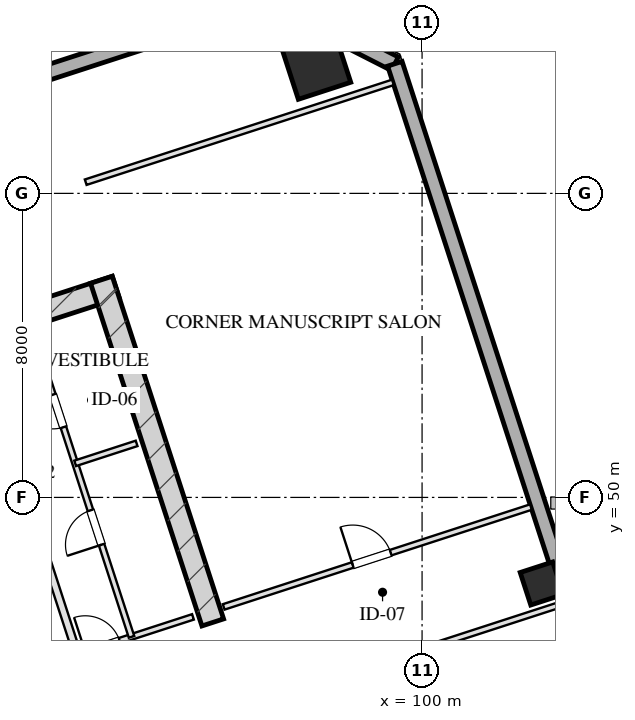
"""IFC4 building model, lengths in metres.
Left out: names, types, materials, properties, quantities, classifications, styles, units other than length and angle.
Written with IfcOpenShell. Run it as: python <this file> out.ifc"""

import sys

from ifc_helpers import new_model, si_unit, direction, frame, frame_2d, origin, origin_2d, place, context, subcontext, project, spatial, rectangle, hollow_rectangle, extrude, element, fill, save


model = new_model("IFC4")
c1 = context("Model", 3, precision=1e-05, world=origin(), true_north=direction((0.0, 1.0)))
c2 = subcontext(c1, "Body", "Model", "MODEL_VIEW")
j1 = project(units=[si_unit("LENGTHUNIT", "METRE"), si_unit("PLANEANGLEUNIT", "RADIAN")], contexts=[c1])
p1 = place(None, origin())
s1 = spatial("IfcSite", under=j1, at=p1, CompositionType="ELEMENT")
p2 = place(p1, origin())
s2 = spatial("IfcBuilding", under=s1, at=p2, CompositionType="ELEMENT")
p3 = place(p2, frame((0.0, 0.0, 100.05)))
s3 = spatial("IfcBuildingStorey", under=s2, at=p3, CompositionType="ELEMENT", Elevation=100.05)
p4 = place(p3, frame((76.344, 50.466, 0.0), z_axis=(0.0, 0.0, 1.0), x_axis=(0.951055727519, 0.309019421968, 0.0)))
e1 = element("IfcWall", 1, at=p4, inside=s3, PredefinedType="SHEAR", context=c2, shape_type="SweptSolid", body=[
    extrude(rectangle(XDim=16.4, YDim=0.6, at=frame_2d((8.2, 0.0))), origin(), (0.0, 0.0, 1.0), 3.45),
])
p5 = place(p3, frame((94.492, 46.71, 0.0), z_axis=(0.0, 0.0, 1.0), x_axis=(-0.309010370028, 0.95105866865, 0.0)))
e2 = element("IfcWall", 2, at=p5, inside=s3, PredefinedType="SHEAR", context=c2, shape_type="SweptSolid", body=[
    extrude(rectangle(XDim=9.48, YDim=0.6, at=frame_2d((4.74, 0.0))), origin(), (0.0, 0.0, 1.0), 3.45),
])
p6 = place(p3, frame((97.209, 61.388, 0.0), z_axis=(0.0, 0.0, 1.0), x_axis=(0.951056516295, 0.309016994375, 0.0)))
e3 = element("IfcColumn", 3, at=p6, inside=s3, PredefinedType="COLUMN", context=c2, shape_type="SweptSolid", body=[
    extrude(hollow_rectangle(XDim=1.45, YDim=1.45, WallThickness=0.05, at=origin_2d()), origin(), (0.0, 0.0, 1.0), 3.451),
])
p7 = place(p3, frame((103.149, 47.736, 0.0), z_axis=(0.0, 0.0, 1.0), x_axis=(0.951056516295, 0.309016994375, 0.0)))
e4 = element("IfcColumn", 4, at=p7, inside=s3, PredefinedType="COLUMN", context=c2, shape_type="SweptSolid", body=[
    extrude(hollow_rectangle(XDim=0.9, YDim=0.9, WallThickness=0.032, at=origin_2d()), origin(), (0.0, 0.0, 1.0), 3.451),
])
p8 = place(p3, frame((68.047, 53.995, 0.0), z_axis=(0.0, 0.0, 1.0), x_axis=(0.95105505922, 0.309021478754, 0.0)))
e5 = element("IfcWall", 5, at=p8, inside=s3, PredefinedType="SOLIDWALL", context=c2, shape_type="SweptSolid", body=[
    extrude(rectangle(XDim=29.4, YDim=0.4, at=frame_2d((14.7, 0.0))), origin(), (0.0, 0.0, 1.0), 2.55),
])
p9 = place(p3, frame((96.008, 63.08, 0.0), z_axis=(0.0, 0.0, 1.0), x_axis=(0.891001999643, -0.45399937955, 0.0)))
e6 = element("IfcWall", 6, at=p9, inside=s3, PredefinedType="SOLIDWALL", context=c2, shape_type="SweptSolid", body=[
    extrude(rectangle(XDim=3.677, YDim=0.4, at=frame_2d((1.839, 0.0))), origin(), (0.0, 0.0, 1.0), 2.55),
])
p10 = place(p3, frame((99.284, 61.41, 0.0), z_axis=(0.0, 0.0, 1.0), x_axis=(0.309017542002, -0.95105633836, 0.0)))
e7 = element("IfcWall", 7, at=p10, inside=s3, PredefinedType="SOLIDWALL", context=c2, shape_type="SweptSolid", body=[
    extrude(rectangle(XDim=46.4, YDim=0.4, at=frame_2d((23.2, 0.0))), origin(), (0.0, 0.0, 1.0), 2.55),
])
p11 = place(p10, frame((19.55, 0.0, 0.0)))
e8 = element("IfcOpeningElement", 8, at=p11, cuts=e7, PredefinedType="OPENING", context=c2, shape_type="SweptSolid", body=[
    extrude(rectangle(XDim=1.1, YDim=2.15, at=frame_2d((0.55, 1.075))), frame((0.0, 0.21, 0.0), z_axis=(0.0, -1.0, 0.0), x_axis=(1.0, 0.0, 0.0)), (0.0, 0.0, 1.0), 0.42),
])
p12 = place(p3, frame((90.928, 45.868, 0.0), z_axis=(0.0, 0.0, 1.0), x_axis=(-0.309042196757, 0.951048327176, 0.0)))
e9 = element("IfcWall", 9, at=p12, inside=s3, PredefinedType="PARTITIONING", context=c2, shape_type="SweptSolid", body=[
    extrude(rectangle(XDim=8.43, YDim=0.2, at=frame_2d((4.215, 0.0))), origin(), (0.0, 0.0, 1.0), 3.155),
])
p13 = place(p3, frame((90.928, 45.868, 0.0), z_axis=(0.0, 0.0, 1.0), x_axis=(0.951059297078, 0.309008435874, 0.0)))
e10 = element("IfcWall", 10, at=p13, inside=s3, PredefinedType="PARTITIONING", context=c2, shape_type="SweptSolid", body=[
    extrude(rectangle(XDim=3.2, YDim=0.15, at=frame_2d((1.6, 0.0))), origin(), (0.0, 0.0, 1.0), 3.155),
])
p14 = place(p13, frame((0.22, 0.0, 0.0)))
e11 = element("IfcOpeningElement", 11, at=p14, cuts=e10, PredefinedType="OPENING", context=c2, shape_type="SweptSolid", body=[
    extrude(rectangle(XDim=0.95, YDim=2.05, at=frame_2d((0.475, 1.025))), frame((0.0, 0.085, 0.0), z_axis=(0.0, -1.0, 0.0), x_axis=(1.0, 0.0, 0.0)), (0.0, 0.0, 1.0), 0.17),
])
p15 = place(p3, frame((92.355, 46.331, 0.0), z_axis=(0.0, 0.0, 1.0), x_axis=(-0.309007490203, 0.951059604335, 0.0)))
e12 = element("IfcWall", 12, at=p15, inside=s3, PredefinedType="PARTITIONING", context=c2, shape_type="SweptSolid", body=[
    extrude(rectangle(XDim=8.43, YDim=0.15, at=frame_2d((4.215, 0.0))), origin(), (0.0, 0.0, 1.0), 3.155),
])
p16 = place(p15, frame((2.55, 0.0, 0.0)))
e13 = element("IfcOpeningElement", 13, at=p16, cuts=e12, PredefinedType="OPENING", context=c2, shape_type="SweptSolid", body=[
    extrude(rectangle(XDim=0.95, YDim=2.05, at=frame_2d((0.475, 1.025))), frame((0.0, 0.085, 0.0), z_axis=(0.0, -1.0, 0.0), x_axis=(1.0, 0.0, 0.0)), (0.0, 0.0, 1.0), 0.17),
])
p17 = place(p15, frame((5.8, 0.0, 0.0)))
e14 = element("IfcOpeningElement", 14, at=p17, cuts=e12, PredefinedType="OPENING", context=c2, shape_type="SweptSolid", body=[
    extrude(rectangle(XDim=0.9, YDim=2.05, at=frame_2d((0.45, 1.025))), frame((0.0, 0.085, 0.0), z_axis=(0.0, -1.0, 0.0), x_axis=(1.0, 0.0, 0.0)), (0.0, 0.0, 1.0), 0.17),
])
p18 = place(p3, frame((90.871, 50.896, 0.0), z_axis=(0.0, 0.0, 1.0), x_axis=(0.951054116971, 0.309024378638, 0.0)))
e15 = element("IfcWall", 15, at=p18, inside=s3, PredefinedType="PARTITIONING", context=c2, shape_type="SweptSolid", body=[
    extrude(rectangle(XDim=1.7, YDim=0.15, at=frame_2d((0.85, 0.0))), origin(), (0.0, 0.0, 1.0), 3.155),
])
p19 = place(p3, frame((91.149, 58.294, 0.0), z_axis=(0.0, 0.0, 1.0), x_axis=(0.951062770994, 0.308997743729, 0.0)))
e16 = element("IfcWall", 16, at=p19, inside=s3, PredefinedType="PARTITIONING", context=c2, shape_type="SweptSolid", body=[
    extrude(rectangle(XDim=8.5, YDim=0.15, at=frame_2d((4.25, 0.0))), origin(), (0.0, 0.0, 1.0), 3.155),
])
p20 = place(p3, frame((94.78, 47.119, 0.0), z_axis=(0.0, 0.0, 1.0), x_axis=(0.951054329824, 0.309023723562, 0.0)))
e17 = element("IfcWall", 17, at=p20, inside=s3, PredefinedType="PARTITIONING", context=c2, shape_type="SweptSolid", body=[
    extrude(rectangle(XDim=8.5, YDim=0.15, at=frame_2d((4.25, 0.0))), origin(), (0.0, 0.0, 1.0), 3.155),
])
p21 = place(p20, frame((3.57, 0.0, 0.0)))
e18 = element("IfcOpeningElement", 18, at=p21, cuts=e17, PredefinedType="OPENING", context=c2, shape_type="SweptSolid", body=[
    extrude(rectangle(XDim=1.05, YDim=2.05, at=frame_2d((0.525, 1.025))), frame((0.0, 0.085, 0.0), z_axis=(0.0, -1.0, 0.0), x_axis=(1.0, 0.0, 0.0)), (0.0, 0.0, 1.0), 0.17),
])
p22 = place(p3, frame((90.567, 42.933, 0.0), z_axis=(0.0, 0.0, 1.0), x_axis=(0.951058377365, 0.309011266531, 0.0)))
e19 = element("IfcWall", 19, at=p22, inside=s3, PredefinedType="PARTITIONING", context=c2, shape_type="SweptSolid", body=[
    extrude(rectangle(XDim=13.8, YDim=0.15, at=frame_2d((6.9, 0.0))), origin(), (0.0, 0.0, 1.0), 3.155),
])
p23 = place(p14, origin())
e20 = element("IfcDoor", 20, at=p23, inside=s3, OperationType="SINGLE_SWING_LEFT", PredefinedType="DOOR", context=c2, shape_type="SweptSolid", body=[
    extrude(rectangle(XDim=0.95, YDim=2.05, at=frame_2d((0.475, 1.025))), frame((0.0, 0.025, 0.0), z_axis=(0.0, -1.0, 0.0), x_axis=(1.0, 0.0, 0.0)), (0.0, 0.0, 1.0), 0.05),
])
fill(e11, e20)
p24 = place(p16, origin())
e21 = element("IfcDoor", 21, at=p24, inside=s3, OperationType="SINGLE_SWING_LEFT", PredefinedType="DOOR", context=c2, shape_type="SweptSolid", body=[
    extrude(rectangle(XDim=0.95, YDim=2.05, at=frame_2d((0.475, 1.025))), frame((0.0, 0.025, 0.0), z_axis=(0.0, -1.0, 0.0), x_axis=(1.0, 0.0, 0.0)), (0.0, 0.0, 1.0), 0.05),
])
fill(e13, e21)
p25 = place(p17, origin())
e22 = element("IfcDoor", 22, at=p25, inside=s3, OperationType="SINGLE_SWING_RIGHT", PredefinedType="DOOR", context=c2, shape_type="SweptSolid", body=[
    extrude(rectangle(XDim=0.9, YDim=2.05, at=frame_2d((0.45, 1.025))), frame((0.0, 0.025, 0.0), z_axis=(0.0, -1.0, 0.0), x_axis=(1.0, 0.0, 0.0)), (0.0, 0.0, 1.0), 0.05),
])
fill(e14, e22)
p26 = place(p21, origin())
e23 = element("IfcDoor", 23, at=p26, inside=s3, OperationType="SINGLE_SWING_LEFT", PredefinedType="DOOR", context=c2, shape_type="SweptSolid", body=[
    extrude(rectangle(XDim=1.05, YDim=2.05, at=frame_2d((0.525, 1.025))), frame((0.0, 0.025, 0.0), z_axis=(0.0, -1.0, 0.0), x_axis=(1.0, 0.0, 0.0)), (0.0, 0.0, 1.0), 0.05),
])
fill(e18, e23)
save(model, sys.argv[1])
